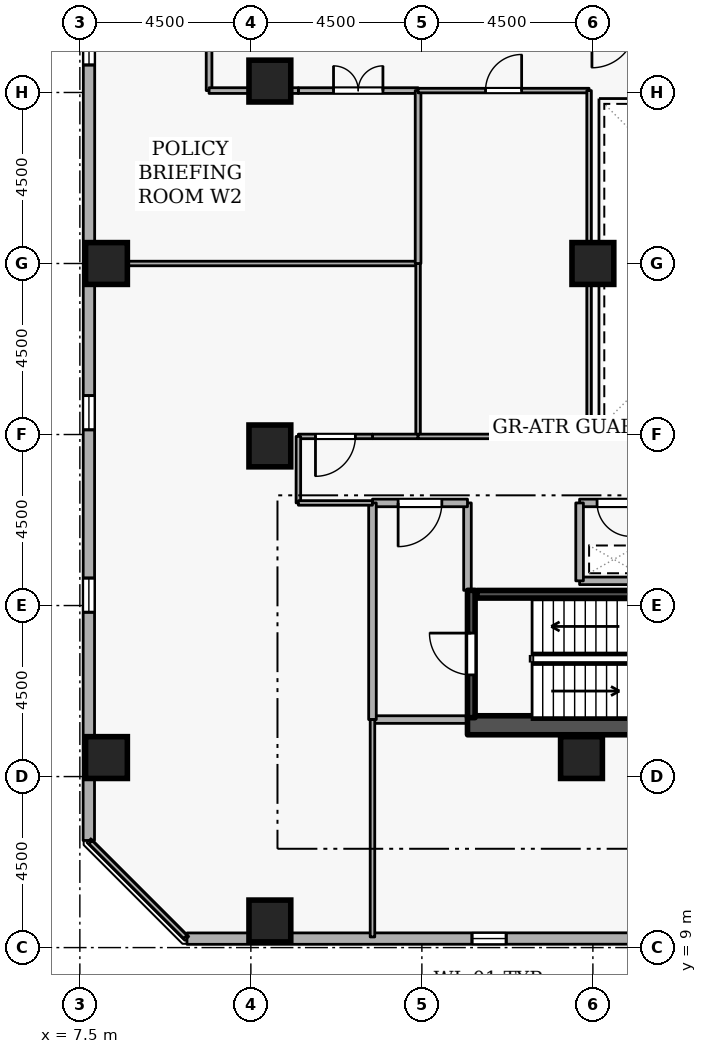
"""IFC4 building model, lengths in metres.
Left out: names, types, materials, properties, quantities, classifications, styles, units other than length and angle.
Written with IfcOpenShell. Run it as: python <this file> out.ifc"""

import sys

from ifc_helpers import new_model, si_unit, direction, frame, frame_2d, origin, origin_2d, place, context, subcontext, project, spatial, rectangle, extrude, element, fill, save


model = new_model("IFC4")
c1 = context("Model", 3, precision=1e-05, world=origin(), true_north=direction((0.0, 1.0)))
c2 = subcontext(c1, "Body", "Model", "MODEL_VIEW")
j1 = project(units=[si_unit("LENGTHUNIT", "METRE"), si_unit("PLANEANGLEUNIT", "RADIAN")], contexts=[c1])
p1 = place(None, origin())
s1 = spatial("IfcSite", under=j1, at=p1, CompositionType="ELEMENT")
p2 = place(p1, origin())
s2 = spatial("IfcBuilding", under=s1, at=p2, CompositionType="ELEMENT")
p3 = place(p2, frame((0.0, 0.0, 185.7)))
s3 = spatial("IfcBuildingStorey", under=s2, at=p3, CompositionType="ELEMENT", Elevation=185.7)
p4 = place(p3, frame((17.7, 14.85, 0.0), z_axis=(0.0, 0.0, 1.0), x_axis=(1.0, 0.0, 0.0)))
e1 = element("IfcWall", 1, at=p4, inside=s3, PredefinedType="SHEAR", context=c2, shape_type="SweptSolid", body=[
    extrude(rectangle(XDim=15.6, YDim=0.5, at=frame_2d((7.8, 0.0))), origin(), (0.0, 0.0, 1.0), 3.6),
])
for number, where, z_axis, x_axis in (
    (2, (12.5, 9.7, 0.0), (0.0, 0.0, 1.0), (1.0, 0.0, 0.0)),
    (3, (8.2, 14.0, 0.0), (0.0, 0.0, 1.0), (1.0, 0.0, 0.0)),
    (4, (8.2, 27.0, 0.0), (0.0, 0.0, 1.0), (1.0, 0.0, 0.0)),
    (5, (12.5, 22.2, 0.0), (0.0, 0.0, 1.0), (1.0, 0.0, 0.0)),
    (6, (12.5, 31.8, 0.0), (0.0, 0.0, 1.0), (1.0, 0.0, 0.0)),
    (7, (20.7, 14.0, 0.0), (0.0, 0.0, 1.0), (1.0, 0.0, 0.0)),
    (8, (21.0, 27.0, 0.0), (0.0, 0.0, 1.0), (1.0, 0.0, 0.0)),
):
    element("IfcColumn", number, at=place(p3, frame(where, z_axis=z_axis, x_axis=x_axis)), inside=s3, PredefinedType="COLUMN", context=c2, shape_type="SweptSolid", body=[
        extrude(rectangle(XDim=1.1, YDim=1.1, at=origin_2d()), origin(), (0.0, 0.0, 1.0), 3.6),
    ])
p5 = place(p3, frame((10.319, 9.235, 0.0), z_axis=(0.0, 0.0, 1.0), x_axis=(0.999999963872, 0.000268805477, 0.0)))
e9 = element("IfcWall", 9, at=p5, inside=s3, PredefinedType="STANDARD", context=c2, shape_type="SweptSolid", body=[
    extrude(rectangle(XDim=33.605, YDim=0.3, at=frame_2d((16.802, 0.0))), origin(), (0.0, 0.0, 1.0), 2.7),
])
p6 = place(p5, frame((7.5, 0.0, 0.72)))
e10 = element("IfcOpeningElement", 10, at=p6, cuts=e9, PredefinedType="OPENING", context=c2, shape_type="SweptSolid", body=[
    extrude(rectangle(XDim=0.9, YDim=1.75, at=frame_2d((0.45, 0.875))), frame((0.0, 0.16, 0.0), z_axis=(0.0, -1.0, 0.0), x_axis=(1.0, 0.0, 0.0)), (0.0, 0.0, 1.0), 0.32),
])
p7 = place(p5, frame((12.3, 0.0, 0.72)))
e11 = element("IfcOpeningElement", 11, at=p7, cuts=e9, PredefinedType="OPENING", context=c2, shape_type="SweptSolid", body=[
    extrude(rectangle(XDim=0.9, YDim=1.75, at=frame_2d((0.45, 0.875))), frame((0.0, 0.16, 0.0), z_axis=(0.0, -1.0, 0.0), x_axis=(1.0, 0.0, 0.0)), (0.0, 0.0, 1.0), 0.32),
])
p8 = place(p5, frame((17.1, 0.0, 0.72)))
e12 = element("IfcOpeningElement", 12, at=p8, cuts=e9, PredefinedType="OPENING", context=c2, shape_type="SweptSolid", body=[
    extrude(rectangle(XDim=0.9, YDim=1.75, at=frame_2d((0.45, 0.875))), frame((0.0, 0.16, 0.0), z_axis=(0.0, -1.0, 0.0), x_axis=(1.0, 0.0, 0.0)), (0.0, 0.0, 1.0), 0.32),
])
p9 = place(p5, frame((21.9, 0.0, 0.72)))
e13 = element("IfcOpeningElement", 13, at=p9, cuts=e9, PredefinedType="OPENING", context=c2, shape_type="SweptSolid", body=[
    extrude(rectangle(XDim=0.9, YDim=1.75, at=frame_2d((0.45, 0.875))), frame((0.0, 0.16, 0.0), z_axis=(0.0, -1.0, 0.0), x_axis=(1.0, 0.0, 0.0)), (0.0, 0.0, 1.0), 0.32),
])
p10 = place(p3, frame((7.744, 45.424, 0.0), z_axis=(0.0, 0.0, 1.0), x_axis=(-0.000268805477, -0.999999963872, 0.0)))
e14 = element("IfcWall", 14, at=p10, inside=s3, PredefinedType="STANDARD", context=c2, shape_type="SweptSolid", body=[
    extrude(rectangle(XDim=33.605, YDim=0.3, at=frame_2d((16.802, 0.0))), origin(), (0.0, 0.0, 1.0), 2.7),
])
p11 = place(p10, frame((2.7, 0.0, 0.72)))
e15 = element("IfcOpeningElement", 15, at=p11, cuts=e14, PredefinedType="OPENING", context=c2, shape_type="SweptSolid", body=[
    extrude(rectangle(XDim=0.9, YDim=1.75, at=frame_2d((0.45, 0.875))), frame((0.0, 0.16, 0.0), z_axis=(0.0, -1.0, 0.0), x_axis=(1.0, 0.0, 0.0)), (0.0, 0.0, 1.0), 0.32),
])
p12 = place(p10, frame((7.5, 0.0, 0.72)))
e16 = element("IfcOpeningElement", 16, at=p12, cuts=e14, PredefinedType="OPENING", context=c2, shape_type="SweptSolid", body=[
    extrude(rectangle(XDim=0.9, YDim=1.75, at=frame_2d((0.45, 0.875))), frame((0.0, 0.16, 0.0), z_axis=(0.0, -1.0, 0.0), x_axis=(1.0, 0.0, 0.0)), (0.0, 0.0, 1.0), 0.32),
])
p13 = place(p10, frame((12.3, 0.0, 0.72)))
e17 = element("IfcOpeningElement", 17, at=p13, cuts=e14, PredefinedType="OPENING", context=c2, shape_type="SweptSolid", body=[
    extrude(rectangle(XDim=0.9, YDim=1.75, at=frame_2d((0.45, 0.875))), frame((0.0, 0.16, 0.0), z_axis=(0.0, -1.0, 0.0), x_axis=(1.0, 0.0, 0.0)), (0.0, 0.0, 1.0), 0.32),
])
p14 = place(p10, frame((21.9, 0.0, 0.72)))
e18 = element("IfcOpeningElement", 18, at=p14, cuts=e14, PredefinedType="OPENING", context=c2, shape_type="SweptSolid", body=[
    extrude(rectangle(XDim=0.9, YDim=1.75, at=frame_2d((0.45, 0.875))), frame((0.0, 0.16, 0.0), z_axis=(0.0, -1.0, 0.0), x_axis=(1.0, 0.0, 0.0)), (0.0, 0.0, 1.0), 0.32),
])
p15 = place(p10, frame((26.7, 0.0, 0.72)))
e19 = element("IfcOpeningElement", 19, at=p15, cuts=e14, PredefinedType="OPENING", context=c2, shape_type="SweptSolid", body=[
    extrude(rectangle(XDim=0.9, YDim=1.75, at=frame_2d((0.45, 0.875))), frame((0.0, 0.16, 0.0), z_axis=(0.0, -1.0, 0.0), x_axis=(1.0, 0.0, 0.0)), (0.0, 0.0, 1.0), 0.32),
])
p16 = place(p3, frame((17.8, 15.05, 0.0), z_axis=(0.0, 0.0, 1.0), x_axis=(0.0, 1.0, 0.0)))
e20 = element("IfcWall", 20, at=p16, inside=s3, PredefinedType="SHEAR", context=c2, shape_type="SweptSolid", body=[
    extrude(rectangle(XDim=3.35, YDim=0.2, at=frame_2d((1.675, 0.0))), origin(), (0.0, 0.0, 1.0), 3.6),
])
p17 = place(p16, frame((1.125, 0.0, 0.0)))
e21 = element("IfcOpeningElement", 21, at=p17, cuts=e20, PredefinedType="OPENING", context=c2, shape_type="SweptSolid", body=[
    extrude(rectangle(XDim=1.1, YDim=2.1, at=frame_2d((0.55, 1.05))), frame((0.0, 0.11, 0.0), z_axis=(0.0, -1.0, 0.0), x_axis=(1.0, 0.0, 0.0)), (0.0, 0.0, 1.0), 0.22),
])
p18 = place(p3, frame((25.05, 18.297, 0.0), z_axis=(0.0, 0.0, 1.0), x_axis=(-1.0, 0.0, 0.0)))
e22 = element("IfcWall", 22, at=p18, inside=s3, PredefinedType="SHEAR", context=c2, shape_type="SweptSolid", body=[
    extrude(rectangle(XDim=7.1, YDim=0.2, at=frame_2d((3.55, 0.0))), origin(), (0.0, 0.0, 1.0), 3.6),
])
p19 = place(p3, frame((15.2, 15.0, 0.0), z_axis=(0.0, 0.0, 1.0), x_axis=(1.0, 0.0, 0.0)))
e23 = element("IfcWall", 23, at=p19, inside=s3, PredefinedType="STANDARD", context=c2, shape_type="SweptSolid", body=[
    extrude(rectangle(XDim=2.5, YDim=0.2, at=frame_2d((1.25, 0.0))), origin(), (0.0, 0.0, 1.0), 3.34),
])
p20 = place(p3, frame((17.7, 18.4, 0.0), z_axis=(0.0, 0.0, 1.0), x_axis=(0.0, 1.0, 0.0)))
e24 = element("IfcWall", 24, at=p20, inside=s3, PredefinedType="STANDARD", context=c2, shape_type="SweptSolid", body=[
    extrude(rectangle(XDim=2.3, YDim=0.2, at=frame_2d((1.15, 0.0))), origin(), (0.0, 0.0, 1.0), 2.545),
])
p21 = place(p3, frame((17.7, 20.7, 0.0), z_axis=(0.0, 0.0, 1.0), x_axis=(-1.0, 0.0, 0.0)))
e25 = element("IfcWall", 25, at=p21, inside=s3, PredefinedType="STANDARD", context=c2, shape_type="SweptSolid", body=[
    extrude(rectangle(XDim=2.5, YDim=0.2, at=frame_2d((1.25, 0.0))), origin(), (0.0, 0.0, 1.0), 3.34),
])
p22 = place(p21, frame((0.675, 0.0, 0.0)))
e26 = element("IfcOpeningElement", 26, at=p22, cuts=e25, PredefinedType="OPENING", context=c2, shape_type="SweptSolid", body=[
    extrude(rectangle(XDim=1.15, YDim=2.1, at=frame_2d((0.575, 1.05))), frame((0.0, 0.11, 0.0), z_axis=(0.0, -1.0, 0.0), x_axis=(1.0, 0.0, 0.0)), (0.0, 0.0, 1.0), 0.22),
])
p23 = place(p3, frame((15.2, 20.7, 0.0), z_axis=(0.0, 0.0, 1.0), x_axis=(0.0, -1.0, 0.0)))
e27 = element("IfcWall", 27, at=p23, inside=s3, PredefinedType="STANDARD", context=c2, shape_type="SweptSolid", body=[
    extrude(rectangle(XDim=5.7, YDim=0.2, at=frame_2d((2.85, 0.0))), origin(), (0.0, 0.0, 1.0), 3.34),
])
p24 = place(p3, frame((20.65, 18.65, 0.0), z_axis=(0.0, 0.0, 1.0), x_axis=(1.0, 0.0, 0.0)))
e28 = element("IfcWall", 28, at=p24, inside=s3, PredefinedType="STANDARD", context=c2, shape_type="SweptSolid", body=[
    extrude(rectangle(XDim=1.8, YDim=0.2, at=frame_2d((0.9, 0.0))), origin(), (0.0, 0.0, 1.0), 3.34),
])
p25 = place(p3, frame((22.45, 20.7, 0.0), z_axis=(0.0, 0.0, 1.0), x_axis=(-1.0, 0.0, 0.0)))
e29 = element("IfcWall", 29, at=p25, inside=s3, PredefinedType="STANDARD", context=c2, shape_type="SweptSolid", body=[
    extrude(rectangle(XDim=1.8, YDim=0.2, at=frame_2d((0.9, 0.0))), origin(), (0.0, 0.0, 1.0), 3.34),
])
p26 = place(p25, frame((0.46, 0.0, 0.0)))
e30 = element("IfcOpeningElement", 30, at=p26, cuts=e29, PredefinedType="OPENING", context=c2, shape_type="SweptSolid", body=[
    extrude(rectangle(XDim=0.88, YDim=2.04, at=frame_2d((0.44, 1.02))), frame((0.0, 0.11, 0.0), z_axis=(0.0, -1.0, 0.0), x_axis=(1.0, 0.0, 0.0)), (0.0, 0.0, 1.0), 0.22),
])
p27 = place(p3, frame((20.65, 20.7, 0.0), z_axis=(0.0, 0.0, 1.0), x_axis=(0.0, -1.0, 0.0)))
e31 = element("IfcWall", 31, at=p27, inside=s3, PredefinedType="STANDARD", context=c2, shape_type="SweptSolid", body=[
    extrude(rectangle(XDim=2.05, YDim=0.2, at=frame_2d((1.025, 0.0))), origin(), (0.0, 0.0, 1.0), 3.34),
])
p28 = place(p3, frame((7.78, 27.0, 0.0), z_axis=(0.0, 0.0, 1.0), x_axis=(1.0, 0.0, 0.0)))
e32 = element("IfcWall", 32, at=p28, inside=s3, PredefinedType="PARTITIONING", context=c2, shape_type="SweptSolid", body=[
    extrude(rectangle(XDim=8.62, YDim=0.12, at=frame_2d((4.31, 0.0))), origin(), (0.0, 0.0, 1.0), 2.878),
])
p29 = place(p3, frame((16.4, 27.0, 0.0), z_axis=(0.0, 0.0, 1.0), x_axis=(0.0, -1.0, 0.0)))
e33 = element("IfcWall", 33, at=p29, inside=s3, PredefinedType="PARTITIONING", context=c2, shape_type="SweptSolid", body=[
    extrude(rectangle(XDim=4.55, YDim=0.12, at=frame_2d((2.275, 0.0))), origin(), (0.0, 0.0, 1.0), 3.34),
])
p30 = place(p3, frame((16.4, 22.45, 0.0), z_axis=(0.0, 0.0, 1.0), x_axis=(-1.0, 0.0, 0.0)))
e34 = element("IfcWall", 34, at=p30, inside=s3, PredefinedType="PARTITIONING", context=c2, shape_type="SweptSolid", body=[
    extrude(rectangle(XDim=1.2, YDim=0.12, at=frame_2d((0.6, 0.0))), origin(), (0.0, 0.0, 1.0), 3.34),
])
p31 = place(p3, frame((15.2, 22.45, 0.0), z_axis=(0.0, 0.0, 1.0), x_axis=(-1.0, 0.0, 0.0)))
e35 = element("IfcWall", 35, at=p31, inside=s3, PredefinedType="PARTITIONING", context=c2, shape_type="SweptSolid", body=[
    extrude(rectangle(XDim=1.95, YDim=0.12, at=frame_2d((0.975, 0.0))), origin(), (0.0, 0.0, 1.0), 3.34),
])
p32 = place(p31, frame((0.45, 0.0, 0.0)))
e36 = element("IfcOpeningElement", 36, at=p32, cuts=e35, PredefinedType="OPENING", context=c2, shape_type="SweptSolid", body=[
    extrude(rectangle(XDim=1.05, YDim=2.1, at=frame_2d((0.525, 1.05))), frame((0.0, 0.07, 0.0), z_axis=(0.0, -1.0, 0.0), x_axis=(1.0, 0.0, 0.0)), (0.0, 0.0, 1.0), 0.14),
])
p33 = place(p3, frame((13.25, 22.45, 0.0), z_axis=(0.0, 0.0, 1.0), x_axis=(0.0, -1.0, 0.0)))
e37 = element("IfcWall", 37, at=p33, inside=s3, PredefinedType="PARTITIONING", context=c2, shape_type="SweptSolid", body=[
    extrude(rectangle(XDim=1.75, YDim=0.12, at=frame_2d((0.875, 0.0))), origin(), (0.0, 0.0, 1.0), 3.34),
])
p34 = place(p3, frame((13.25, 20.7, 0.0), z_axis=(0.0, 0.0, 1.0), x_axis=(1.0, 0.0, 0.0)))
e38 = element("IfcWall", 38, at=p34, inside=s3, PredefinedType="PARTITIONING", context=c2, shape_type="SweptSolid", body=[
    extrude(rectangle(XDim=1.95, YDim=0.12, at=frame_2d((0.975, 0.0))), origin(), (0.0, 0.0, 1.0), 3.34),
])
p35 = place(p3, frame((15.2, 15.0, 0.0), z_axis=(0.0, 0.0, 1.0), x_axis=(0.0, -1.0, 0.0)))
e39 = element("IfcWall", 39, at=p35, inside=s3, PredefinedType="PARTITIONING", context=c2, shape_type="SweptSolid", body=[
    extrude(rectangle(XDim=5.72, YDim=0.12, at=frame_2d((2.86, 0.0))), origin(), (0.0, 0.0, 1.0), 3.34),
])
p36 = place(p3, frame((10.275, 9.28, 0.0), z_axis=(0.0, 0.0, 1.0), x_axis=(-0.707106781187, 0.707106781187, 0.0)))
e40 = element("IfcWall", 40, at=p36, inside=s3, PredefinedType="PARTITIONING", context=c2, shape_type="SweptSolid", body=[
    extrude(rectangle(XDim=3.528, YDim=0.12, at=frame_2d((1.764, 0.0))), origin(), (0.0, 0.0, 1.0), 3.34),
])
p37 = place(p3, frame((13.25, 31.55, 0.0), z_axis=(0.0, 0.0, 1.0), x_axis=(1.0, 0.0, 0.0)))
e41 = element("IfcWall", 41, at=p37, inside=s3, PredefinedType="PARTITIONING", context=c2, shape_type="SweptSolid", body=[
    extrude(rectangle(XDim=3.15, YDim=0.15, at=frame_2d((1.575, 0.0))), origin(), (0.0, 0.0, 1.0), 3.34),
])
p38 = place(p37, frame((0.925, 0.0, 0.0)))
e42 = element("IfcOpeningElement", 42, at=p38, cuts=e41, PredefinedType="OPENING", context=c2, shape_type="SweptSolid", body=[
    extrude(rectangle(XDim=1.3, YDim=2.12, at=frame_2d((0.65, 1.06))), frame((0.0, 0.085, 0.0), z_axis=(0.0, -1.0, 0.0), x_axis=(1.0, 0.0, 0.0)), (0.0, 0.0, 1.0), 0.17),
])
p39 = place(p3, frame((16.4, 31.55, 0.0), z_axis=(0.0, 0.0, 1.0), x_axis=(0.0, -1.0, 0.0)))
e43 = element("IfcWall", 43, at=p39, inside=s3, PredefinedType="PARTITIONING", context=c2, shape_type="SweptSolid", body=[
    extrude(rectangle(XDim=4.55, YDim=0.15, at=frame_2d((2.275, 0.0))), origin(), (0.0, 0.0, 1.0), 3.34),
])
p40 = place(p3, frame((10.9, 33.862, 0.0), z_axis=(0.0, 0.0, 1.0), x_axis=(0.0, -1.0, 0.0)))
e44 = element("IfcWall", 44, at=p40, inside=s3, PredefinedType="PARTITIONING", context=c2, shape_type="SweptSolid", body=[
    extrude(rectangle(XDim=2.312, YDim=0.15, at=frame_2d((1.156, 0.0))), origin(), (0.0, 0.0, 1.0), 3.34),
])
p41 = place(p3, frame((10.9, 31.55, 0.0), z_axis=(0.0, 0.0, 1.0), x_axis=(1.0, 0.0, 0.0)))
e45 = element("IfcWall", 45, at=p41, inside=s3, PredefinedType="PARTITIONING", context=c2, shape_type="SweptSolid", body=[
    extrude(rectangle(XDim=2.35, YDim=0.15, at=frame_2d((1.175, 0.0))), origin(), (0.0, 0.0, 1.0), 3.34),
])
p42 = place(p3, frame((16.4, 31.55, 0.0), z_axis=(0.0, 0.0, 1.0), x_axis=(1.0, 0.0, 0.0)))
e46 = element("IfcWall", 46, at=p42, inside=s3, PredefinedType="PARTITIONING", context=c2, shape_type="SweptSolid", body=[
    extrude(rectangle(XDim=4.5, YDim=0.12, at=frame_2d((2.25, 0.0))), origin(), (0.0, 0.0, 1.0), 3.34),
])
p43 = place(p42, frame((1.775, 0.0, 0.0)))
e47 = element("IfcOpeningElement", 47, at=p43, cuts=e46, PredefinedType="OPENING", context=c2, shape_type="SweptSolid", body=[
    extrude(rectangle(XDim=0.95, YDim=2.1, at=frame_2d((0.475, 1.05))), frame((0.0, 0.07, 0.0), z_axis=(0.0, -1.0, 0.0), x_axis=(1.0, 0.0, 0.0)), (0.0, 0.0, 1.0), 0.14),
])
p44 = place(p3, frame((20.9, 31.55, 0.0), z_axis=(0.0, 0.0, 1.0), x_axis=(0.0, -1.0, 0.0)))
e48 = element("IfcWall", 48, at=p44, inside=s3, PredefinedType="PARTITIONING", context=c2, shape_type="SweptSolid", body=[
    extrude(rectangle(XDim=9.1, YDim=0.12, at=frame_2d((4.55, 0.0))), origin(), (0.0, 0.0, 1.0), 3.34),
])
p45 = place(p3, frame((20.9, 22.45, 0.0), z_axis=(0.0, 0.0, 1.0), x_axis=(-1.0, 0.0, 0.0)))
e49 = element("IfcWall", 49, at=p45, inside=s3, PredefinedType="PARTITIONING", context=c2, shape_type="SweptSolid", body=[
    extrude(rectangle(XDim=4.5, YDim=0.12, at=frame_2d((2.25, 0.0))), origin(), (0.0, 0.0, 1.0), 3.34),
])
p46 = place(p6, origin())
e50 = element("IfcWindow", 50, at=p46, inside=s3, PartitioningType="SINGLE_PANEL", PredefinedType="WINDOW", context=c2, shape_type="SweptSolid", body=[
    extrude(rectangle(XDim=0.9, YDim=1.75, at=frame_2d((0.45, 0.875))), frame((0.0, 0.03, 0.0), z_axis=(0.0, -1.0, 0.0), x_axis=(1.0, 0.0, 0.0)), (0.0, 0.0, 1.0), 0.06),
])
fill(e10, e50)
p47 = place(p13, origin())
e51 = element("IfcWindow", 51, at=p47, inside=s3, PartitioningType="SINGLE_PANEL", PredefinedType="WINDOW", context=c2, shape_type="SweptSolid", body=[
    extrude(rectangle(XDim=0.9, YDim=1.75, at=frame_2d((0.45, 0.875))), frame((0.0, 0.03, 0.0), z_axis=(0.0, -1.0, 0.0), x_axis=(1.0, 0.0, 0.0)), (0.0, 0.0, 1.0), 0.06),
])
fill(e17, e51)
p48 = place(p14, origin())
e52 = element("IfcWindow", 52, at=p48, inside=s3, PartitioningType="SINGLE_PANEL", PredefinedType="WINDOW", context=c2, shape_type="SweptSolid", body=[
    extrude(rectangle(XDim=0.9, YDim=1.75, at=frame_2d((0.45, 0.875))), frame((0.0, 0.03, 0.0), z_axis=(0.0, -1.0, 0.0), x_axis=(1.0, 0.0, 0.0)), (0.0, 0.0, 1.0), 0.06),
])
fill(e18, e52)
p49 = place(p15, origin())
e53 = element("IfcWindow", 53, at=p49, inside=s3, PartitioningType="SINGLE_PANEL", PredefinedType="WINDOW", context=c2, shape_type="SweptSolid", body=[
    extrude(rectangle(XDim=0.9, YDim=1.75, at=frame_2d((0.45, 0.875))), frame((0.0, 0.03, 0.0), z_axis=(0.0, -1.0, 0.0), x_axis=(1.0, 0.0, 0.0)), (0.0, 0.0, 1.0), 0.06),
])
fill(e19, e53)
p50 = place(p17, origin())
e54 = element("IfcDoor", 54, at=p50, inside=s3, OperationType="SINGLE_SWING_RIGHT", PredefinedType="DOOR", context=c2, shape_type="SweptSolid", body=[
    extrude(rectangle(XDim=1.1, YDim=2.1, at=frame_2d((0.55, 1.05))), frame((0.0, 0.025, 0.0), z_axis=(0.0, -1.0, 0.0), x_axis=(1.0, 0.0, 0.0)), (0.0, 0.0, 1.0), 0.05),
])
fill(e21, e54)
p51 = place(p22, origin())
e55 = element("IfcDoor", 55, at=p51, inside=s3, OperationType="SINGLE_SWING_RIGHT", PredefinedType="DOOR", context=c2, shape_type="SweptSolid", body=[
    extrude(rectangle(XDim=1.15, YDim=2.1, at=frame_2d((0.575, 1.05))), frame((0.0, 0.025, 0.0), z_axis=(0.0, -1.0, 0.0), x_axis=(1.0, 0.0, 0.0)), (0.0, 0.0, 1.0), 0.05),
])
fill(e26, e55)
p52 = place(p26, origin())
e56 = element("IfcDoor", 56, at=p52, inside=s3, OperationType="SINGLE_SWING_LEFT", PredefinedType="DOOR", context=c2, shape_type="SweptSolid", body=[
    extrude(rectangle(XDim=0.88, YDim=2.04, at=frame_2d((0.44, 1.02))), frame((0.0, 0.025, 0.0), z_axis=(0.0, -1.0, 0.0), x_axis=(1.0, 0.0, 0.0)), (0.0, 0.0, 1.0), 0.05),
])
fill(e30, e56)
p53 = place(p32, origin())
e57 = element("IfcDoor", 57, at=p53, inside=s3, OperationType="SINGLE_SWING_RIGHT", PredefinedType="DOOR", context=c2, shape_type="SweptSolid", body=[
    extrude(rectangle(XDim=1.05, YDim=2.1, at=frame_2d((0.525, 1.05))), frame((0.0, 0.025, 0.0), z_axis=(0.0, -1.0, 0.0), x_axis=(1.0, 0.0, 0.0)), (0.0, 0.0, 1.0), 0.05),
])
fill(e36, e57)
p54 = place(p38, origin())
e58 = element("IfcDoor", 58, at=p54, inside=s3, OperationType="DOUBLE_DOOR_SINGLE_SWING", PredefinedType="DOOR", context=c2, shape_type="SweptSolid", body=[
    extrude(rectangle(XDim=1.3, YDim=2.12, at=frame_2d((0.65, 1.06))), frame((0.0, 0.025, 0.0), z_axis=(0.0, -1.0, 0.0), x_axis=(1.0, 0.0, 0.0)), (0.0, 0.0, 1.0), 0.05),
])
fill(e42, e58)
p55 = place(p43, origin())
e59 = element("IfcDoor", 59, at=p55, inside=s3, OperationType="SINGLE_SWING_RIGHT", PredefinedType="DOOR", context=c2, shape_type="SweptSolid", body=[
    extrude(rectangle(XDim=0.95, YDim=2.1, at=frame_2d((0.475, 1.05))), frame((0.0, 0.025, 0.0), z_axis=(0.0, -1.0, 0.0), x_axis=(1.0, 0.0, 0.0)), (0.0, 0.0, 1.0), 0.05),
])
fill(e47, e59)
save(model, sys.argv[1])
